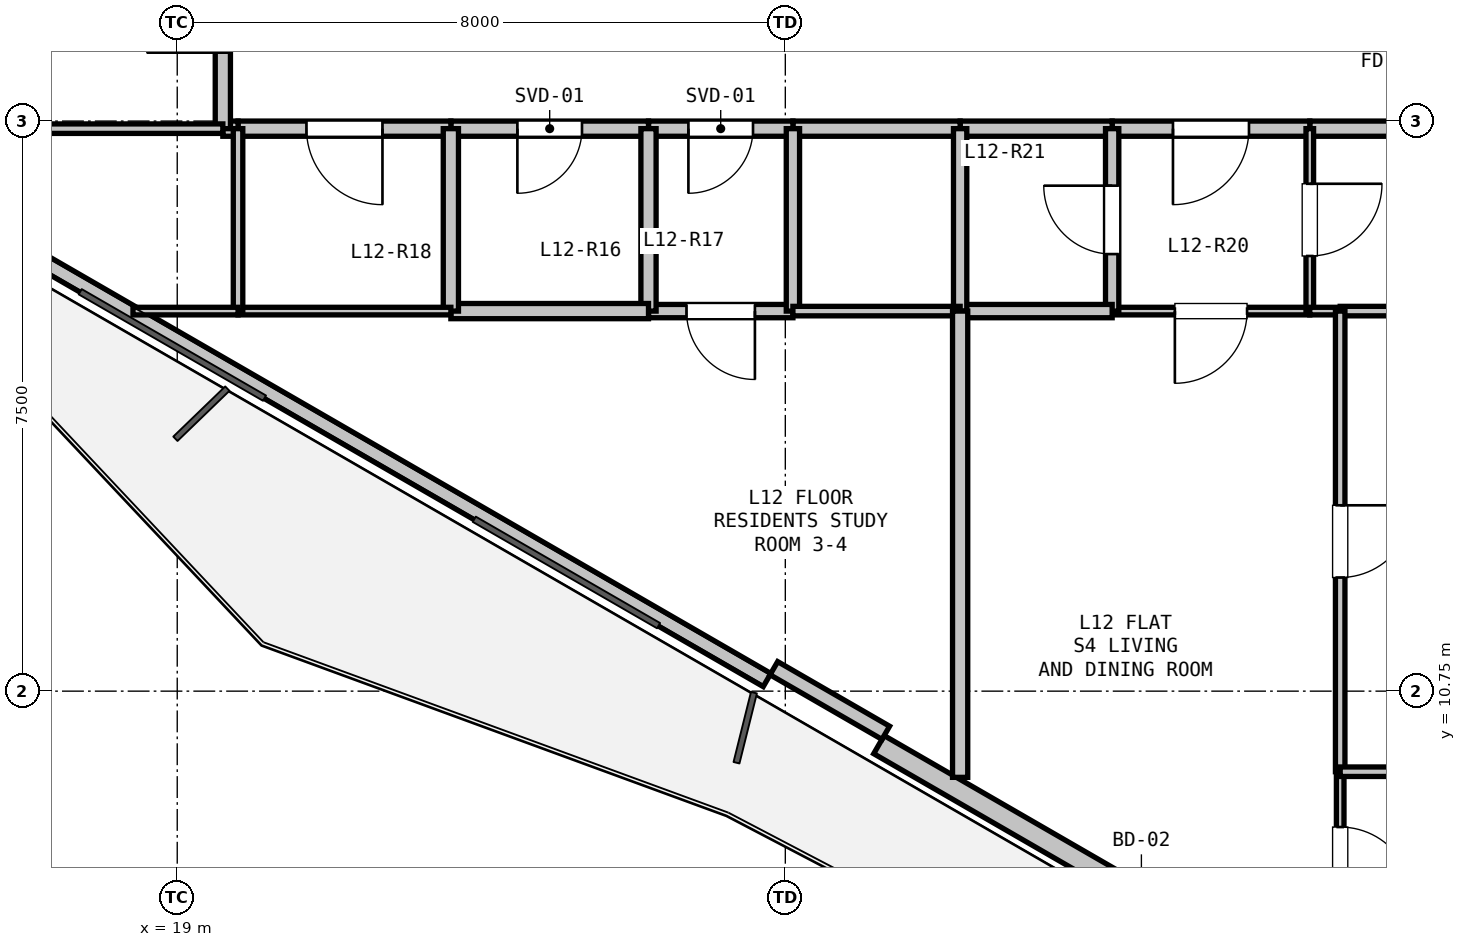
"""IFC4 building model, lengths in metres.
Left out: names, types, materials, properties, quantities, classifications, styles, units other than length and angle.
Written with IfcOpenShell. Run it as: python <this file> out.ifc"""

import sys

from ifc_helpers import new_model, si_unit, direction, frame, frame_2d, origin, place, context, subcontext, project, spatial, rectangle, extrude, element, fill, save


model = new_model("IFC4")
c1 = context("Model", 3, precision=1e-05, world=origin(), true_north=direction((0.0, 1.0)))
c2 = subcontext(c1, "Body", "Model", "MODEL_VIEW")
j1 = project(units=[si_unit("LENGTHUNIT", "METRE"), si_unit("PLANEANGLEUNIT", "RADIAN")], contexts=[c1])
p1 = place(None, origin())
s1 = spatial("IfcSite", under=j1, at=p1, CompositionType="ELEMENT")
p2 = place(p1, origin())
s2 = spatial("IfcBuilding", under=s1, at=p2, CompositionType="ELEMENT")
p3 = place(p2, frame((0.0, 0.0, 45.6)))
s3 = spatial("IfcBuildingStorey", under=s2, at=p3, CompositionType="ELEMENT", Elevation=45.6)
p4 = place(p3, frame((39.207, 3.71, 0.0), z_axis=(0.0, 0.0, 1.0), x_axis=(-0.86603192154, 0.499988710747, 0.0)))
e1 = element("IfcWall", 1, at=p4, inside=s3, PredefinedType="SOLIDWALL", context=c2, shape_type="SweptSolid", body=[
    extrude(rectangle(XDim=12.673, YDim=0.275, at=frame_2d((6.336, 0.0))), origin(), (0.0, 0.0, 1.0), 2.66),
])
p5 = place(p4, frame((8.136, 0.0, 0.0)))
e2 = element("IfcOpeningElement", 2, at=p5, cuts=e1, PredefinedType="OPENING", context=c2, shape_type="SweptSolid", body=[
    extrude(rectangle(XDim=1.1, YDim=2.1, at=frame_2d((0.55, 1.05))), frame((0.0, 0.147, 0.0), z_axis=(0.0, -1.0, 0.0), x_axis=(1.0, 0.0, 0.0)), (0.0, 0.0, 1.0), 0.295),
])
p6 = place(p4, frame((2.518, 0.0, 0.9)))
e3 = element("IfcOpeningElement", 3, at=p6, cuts=e1, PredefinedType="OPENING", context=c2, shape_type="SweptSolid", body=[
    extrude(rectangle(XDim=1.2, YDim=1.4, at=frame_2d((0.6, 0.7))), frame((0.0, 0.147, 0.0), z_axis=(0.0, -1.0, 0.0), x_axis=(1.0, 0.0, 0.0)), (0.0, 0.0, 1.0), 0.295),
])
p7 = place(p3, frame((26.76, 10.896, 0.0), z_axis=(0.0, 0.0, 1.0), x_axis=(-0.866027351828, 0.499996625875, 0.0)))
e4 = element("IfcWall", 4, at=p7, inside=s3, PredefinedType="PARAPET", context=c2, shape_type="SweptSolid", body=[
    extrude(rectangle(XDim=11.973, YDim=0.2, at=frame_2d((5.987, 0.0))), origin(), (0.0, 0.0, 1.0), 0.2),
])
p8 = place(p3, frame((28.322, 10.202, 0.0), z_axis=(0.0, 0.0, 1.0), x_axis=(-0.86605165483, 0.499954529098, 0.0)))
e5 = element("IfcWall", 5, at=p8, inside=s3, PredefinedType="PARAPET", context=c2, shape_type="SweptSolid", body=[
    extrude(rectangle(XDim=1.7, YDim=0.2, at=frame_2d((0.85, 0.0))), origin(), (0.0, 0.0, 1.0), 2.66),
])
p9 = place(p3, frame((35.8, 18.15, 0.0), z_axis=(0.0, 0.0, 1.0), x_axis=(-1.0, 0.0, 0.0)))
e6 = element("IfcWall", 6, at=p9, inside=s3, PredefinedType="PARTITIONING", context=c2, shape_type="SweptSolid", body=[
    extrude(rectangle(XDim=1.9, YDim=0.2, at=frame_2d((0.95, 0.0))), origin(), (0.0, 0.0, 1.0), 3.04),
])
p10 = place(p3, frame((33.9, 18.15, 0.0), z_axis=(0.0, 0.0, 1.0), x_axis=(-1.0, 0.0, 0.0)))
e7 = element("IfcWall", 7, at=p10, inside=s3, PredefinedType="PARTITIONING", context=c2, shape_type="SweptSolid", body=[
    extrude(rectangle(XDim=2.6, YDim=0.2, at=frame_2d((1.3, 0.0))), origin(), (0.0, 0.0, 1.0), 3.04),
])
p11 = place(p10, frame((0.8, 0.0, 0.0)))
e8 = element("IfcOpeningElement", 8, at=p11, cuts=e7, PredefinedType="OPENING", context=c2, shape_type="SweptSolid", body=[
    extrude(rectangle(XDim=1.0, YDim=2.15, at=frame_2d((0.5, 1.075))), frame((0.0, 0.11, 0.0), z_axis=(0.0, -1.0, 0.0), x_axis=(1.0, 0.0, 0.0)), (0.0, 0.0, 1.0), 0.22),
])
p12 = place(p3, frame((31.3, 18.15, 0.0), z_axis=(0.0, 0.0, 1.0), x_axis=(-1.0, 0.0, 0.0)))
e9 = element("IfcWall", 9, at=p12, inside=s3, PredefinedType="PARTITIONING", context=c2, shape_type="SweptSolid", body=[
    extrude(rectangle(XDim=2.0, YDim=0.2, at=frame_2d((1.0, 0.0))), origin(), (0.0, 0.0, 1.0), 3.04),
])
p13 = place(p3, frame((29.3, 18.15, 0.0), z_axis=(0.0, 0.0, 1.0), x_axis=(-1.0, 0.0, 0.0)))
e10 = element("IfcWall", 10, at=p13, inside=s3, PredefinedType="PARTITIONING", context=c2, shape_type="SweptSolid", body=[
    extrude(rectangle(XDim=2.2, YDim=0.2, at=frame_2d((1.1, 0.0))), origin(), (0.0, 0.0, 1.0), 3.04),
])
p14 = place(p3, frame((27.1, 18.15, 0.0), z_axis=(0.0, 0.0, 1.0), x_axis=(-1.0, 0.0, 0.0)))
e11 = element("IfcWall", 11, at=p14, inside=s3, PredefinedType="PARTITIONING", context=c2, shape_type="SweptSolid", body=[
    extrude(rectangle(XDim=1.9, YDim=0.2, at=frame_2d((0.95, 0.0))), origin(), (0.0, 0.0, 1.0), 3.04),
])
p15 = place(p14, frame((0.525, 0.0, 0.0)))
e12 = element("IfcOpeningElement", 12, at=p15, cuts=e11, PredefinedType="OPENING", context=c2, shape_type="SweptSolid", body=[
    extrude(rectangle(XDim=0.85, YDim=2.1, at=frame_2d((0.425, 1.05))), frame((0.0, 0.11, 0.0), z_axis=(0.0, -1.0, 0.0), x_axis=(1.0, 0.0, 0.0)), (0.0, 0.0, 1.0), 0.22),
])
p16 = place(p3, frame((25.2, 18.15, 0.0), z_axis=(0.0, 0.0, 1.0), x_axis=(-1.0, 0.0, 0.0)))
e13 = element("IfcWall", 13, at=p16, inside=s3, PredefinedType="PARTITIONING", context=c2, shape_type="SweptSolid", body=[
    extrude(rectangle(XDim=2.6, YDim=0.2, at=frame_2d((1.3, 0.0))), origin(), (0.0, 0.0, 1.0), 2.337),
])
p17 = place(p16, frame((0.875, 0.0, 0.0)))
e14 = element("IfcOpeningElement", 14, at=p17, cuts=e13, PredefinedType="OPENING", context=c2, shape_type="SweptSolid", body=[
    extrude(rectangle(XDim=0.85, YDim=2.1, at=frame_2d((0.425, 1.05))), frame((0.0, 0.11, 0.0), z_axis=(0.0, -1.0, 0.0), x_axis=(1.0, 0.0, 0.0)), (0.0, 0.0, 1.0), 0.22),
])
p18 = place(p3, frame((22.6, 18.15, 0.0), z_axis=(0.0, 0.0, 1.0), x_axis=(-1.0, 0.0, 0.0)))
e15 = element("IfcWall", 15, at=p18, inside=s3, PredefinedType="PARTITIONING", context=c2, shape_type="SweptSolid", body=[
    extrude(rectangle(XDim=2.8, YDim=0.2, at=frame_2d((1.4, 0.0))), origin(), (0.0, 0.0, 1.0), 3.04),
])
p19 = place(p18, frame((0.9, 0.0, 0.0)))
e16 = element("IfcOpeningElement", 16, at=p19, cuts=e15, PredefinedType="OPENING", context=c2, shape_type="SweptSolid", body=[
    extrude(rectangle(XDim=1.0, YDim=2.15, at=frame_2d((0.5, 1.075))), frame((0.0, 0.11, 0.0), z_axis=(0.0, -1.0, 0.0), x_axis=(1.0, 0.0, 0.0)), (0.0, 0.0, 1.0), 0.22),
])
p20 = place(p3, frame((19.8, 18.15, 0.0), z_axis=(0.0, 0.0, 1.0), x_axis=(-1.0, 0.0, 0.0)))
e17 = element("IfcWall", 17, at=p20, inside=s3, PredefinedType="PARTITIONING", context=c2, shape_type="SweptSolid", body=[
    extrude(rectangle(XDim=0.2, YDim=0.2, at=frame_2d((0.1, 0.0))), origin(), (0.0, 0.0, 1.0), 3.04),
])
p21 = place(p3, frame((19.6, 18.15, 0.0), z_axis=(0.0, 0.0, 1.0), x_axis=(0.0, 1.0, 0.0)))
e18 = element("IfcWall", 18, at=p21, inside=s3, PredefinedType="PARTITIONING", context=c2, shape_type="SweptSolid", body=[
    extrude(rectangle(XDim=3.0, YDim=0.2, at=frame_2d((1.5, 0.0))), origin(), (0.0, 0.0, 1.0), 2.337),
])
p22 = place(p21, frame((1.0, 0.0, 0.0)))
e19 = element("IfcOpeningElement", 19, at=p22, cuts=e18, PredefinedType="OPENING", context=c2, shape_type="SweptSolid", body=[
    extrude(rectangle(XDim=1.0, YDim=2.15, at=frame_2d((0.5, 1.075))), frame((0.0, 0.11, 0.0), z_axis=(0.0, -1.0, 0.0), x_axis=(1.0, 0.0, 0.0)), (0.0, 0.0, 1.0), 0.22),
])
p23 = place(p3, frame((33.9, 15.75, 0.0), z_axis=(0.0, 0.0, 1.0), x_axis=(-1.0, 0.0, 0.0)))
e20 = element("IfcWall", 20, at=p23, inside=s3, PredefinedType="PARTITIONING", context=c2, shape_type="SweptSolid", body=[
    extrude(rectangle(XDim=2.6, YDim=0.1, at=frame_2d((1.3, 0.0))), origin(), (0.0, 0.0, 1.0), 3.04),
])
p24 = place(p23, frame((0.825, 0.0, 0.0)))
e21 = element("IfcOpeningElement", 21, at=p24, cuts=e20, PredefinedType="OPENING", context=c2, shape_type="SweptSolid", body=[
    extrude(rectangle(XDim=0.95, YDim=2.1, at=frame_2d((0.475, 1.05))), frame((0.0, 0.06, 0.0), z_axis=(0.0, -1.0, 0.0), x_axis=(1.0, 0.0, 0.0)), (0.0, 0.0, 1.0), 0.12),
])
p25 = place(p3, frame((31.3, 15.75, 0.0), z_axis=(0.0, 0.0, 1.0), x_axis=(0.0, 1.0, 0.0)))
e22 = element("IfcWall", 22, at=p25, inside=s3, PredefinedType="PLUMBINGWALL", context=c2, shape_type="SweptSolid", body=[
    extrude(rectangle(XDim=2.4, YDim=0.175, at=frame_2d((1.2, 0.0))), origin(), (0.0, 0.0, 1.0), 3.04),
])
p26 = place(p25, frame((0.75, 0.0, 0.0)))
e23 = element("IfcOpeningElement", 23, at=p26, cuts=e22, PredefinedType="OPENING", context=c2, shape_type="SweptSolid", body=[
    extrude(rectangle(XDim=0.9, YDim=2.1, at=frame_2d((0.45, 1.05))), frame((0.0, 0.097, 0.0), z_axis=(0.0, -1.0, 0.0), x_axis=(1.0, 0.0, 0.0)), (0.0, 0.0, 1.0), 0.195),
])
p27 = place(p3, frame((33.9, 18.15, 0.0), z_axis=(0.0, 0.0, 1.0), x_axis=(0.0, -1.0, 0.0)))
e24 = element("IfcWall", 24, at=p27, inside=s3, PredefinedType="PARTITIONING", context=c2, shape_type="SweptSolid", body=[
    extrude(rectangle(XDim=2.4, YDim=0.1, at=frame_2d((1.2, 0.0))), origin(), (0.0, 0.0, 1.0), 3.04),
])
p28 = place(p27, frame((0.725, 0.0, 0.0)))
e25 = element("IfcOpeningElement", 25, at=p28, cuts=e24, PredefinedType="OPENING", context=c2, shape_type="SweptSolid", body=[
    extrude(rectangle(XDim=0.95, YDim=2.1, at=frame_2d((0.475, 1.05))), frame((0.0, 0.06, 0.0), z_axis=(0.0, -1.0, 0.0), x_axis=(1.0, 0.0, 0.0)), (0.0, 0.0, 1.0), 0.12),
])
p29 = place(p3, frame((27.1, 15.75, 0.0), z_axis=(0.0, 0.0, 1.0), x_axis=(-1.0, 0.0, 0.0)))
e26 = element("IfcWall", 26, at=p29, inside=s3, PredefinedType="PLUMBINGWALL", context=c2, shape_type="SweptSolid", body=[
    extrude(rectangle(XDim=1.9, YDim=0.175, at=frame_2d((0.95, 0.0))), origin(), (0.0, 0.0, 1.0), 2.337),
])
p30 = place(p29, frame((0.5, 0.0, 0.0)))
e27 = element("IfcOpeningElement", 27, at=p30, cuts=e26, PredefinedType="OPENING", context=c2, shape_type="SweptSolid", body=[
    extrude(rectangle(XDim=0.9, YDim=2.1, at=frame_2d((0.45, 1.05))), frame((0.0, 0.097, 0.0), z_axis=(0.0, -1.0, 0.0), x_axis=(1.0, 0.0, 0.0)), (0.0, 0.0, 1.0), 0.195),
])
p31 = place(p3, frame((25.2, 15.75, 0.0), z_axis=(0.0, 0.0, 1.0), x_axis=(0.0, 1.0, 0.0)))
e28 = element("IfcWall", 28, at=p31, inside=s3, PredefinedType="PARTITIONING", context=c2, shape_type="SweptSolid", body=[
    extrude(rectangle(XDim=2.4, YDim=0.2, at=frame_2d((1.2, 0.0))), origin(), (0.0, 0.0, 1.0), 2.337),
])
p32 = place(p3, frame((27.1, 18.15, 0.0), z_axis=(0.0, 0.0, 1.0), x_axis=(0.0, -1.0, 0.0)))
e29 = element("IfcWall", 29, at=p32, inside=s3, PredefinedType="PLUMBINGWALL", context=c2, shape_type="SweptSolid", body=[
    extrude(rectangle(XDim=2.4, YDim=0.175, at=frame_2d((1.2, 0.0))), origin(), (0.0, 0.0, 1.0), 3.04),
])
p33 = place(p3, frame((31.3, 15.75, 0.0), z_axis=(0.0, 0.0, 1.0), x_axis=(-1.0, 0.0, 0.0)))
e30 = element("IfcWall", 30, at=p33, inside=s3, PredefinedType="PLUMBINGWALL", context=c2, shape_type="SweptSolid", body=[
    extrude(rectangle(XDim=2.0, YDim=0.175, at=frame_2d((1.0, 0.0))), origin(), (0.0, 0.0, 1.0), 3.04),
])
p34 = place(p3, frame((29.3, 15.75, 0.0), z_axis=(0.0, 0.0, 1.0), x_axis=(0.0, 1.0, 0.0)))
e31 = element("IfcWall", 31, at=p34, inside=s3, PredefinedType="PLUMBINGWALL", context=c2, shape_type="SweptSolid", body=[
    extrude(rectangle(XDim=2.4, YDim=0.175, at=frame_2d((1.2, 0.0))), origin(), (0.0, 0.0, 1.0), 3.04),
])
p35 = place(p3, frame((43.688, 15.75, 0.0), z_axis=(0.0, 0.0, 1.0), x_axis=(-1.0, 0.0, 0.0)))
e32 = element("IfcWall", 32, at=p35, inside=s3, PredefinedType="PARTITIONING", context=c2, shape_type="SweptSolid", body=[
    extrude(rectangle(XDim=9.388, YDim=0.125, at=frame_2d((4.694, 0.0))), origin(), (0.0, 0.0, 1.0), 2.337),
])
p36 = place(p35, frame((4.219, 0.0, 0.0)))
e33 = element("IfcOpeningElement", 33, at=p36, cuts=e32, PredefinedType="OPENING", context=c2, shape_type="SweptSolid", body=[
    extrude(rectangle(XDim=0.95, YDim=2.1, at=frame_2d((0.475, 1.05))), frame((0.0, 0.073, 0.0), z_axis=(0.0, -1.0, 0.0), x_axis=(1.0, 0.0, 0.0)), (0.0, 0.0, 1.0), 0.145),
])
p37 = place(p3, frame((34.3, 15.75, 0.0), z_axis=(0.0, 0.0, 1.0), x_axis=(-1.0, 0.0, 0.0)))
e34 = element("IfcWall", 34, at=p37, inside=s3, PredefinedType="PARTITIONING", context=c2, shape_type="SweptSolid", body=[
    extrude(rectangle(XDim=0.4, YDim=0.1, at=frame_2d((0.2, 0.0))), origin(), (0.0, 0.0, 1.0), 3.04),
])
p38 = place(p3, frame((19.6, 18.15, 0.0), z_axis=(0.0, 0.0, 1.0), x_axis=(-1.0, 0.0, 0.0)))
e35 = element("IfcWall", 35, at=p38, inside=s3, PredefinedType="PARTITIONING", context=c2, shape_type="SweptSolid", body=[
    extrude(rectangle(XDim=2.45, YDim=0.125, at=frame_2d((1.225, 0.0))), origin(), (0.0, 0.0, 1.0), 3.04),
])
p39 = place(p3, frame((25.2, 15.75, 0.0), z_axis=(0.0, 0.0, 1.0), x_axis=(-1.0, 0.0, 0.0)))
e36 = element("IfcWall", 36, at=p39, inside=s3, PredefinedType="PARTITIONING", context=c2, shape_type="SweptSolid", body=[
    extrude(rectangle(XDim=2.6, YDim=0.2, at=frame_2d((1.3, 0.0))), origin(), (0.0, 0.0, 1.0), 3.04),
])
p40 = place(p3, frame((22.6, 15.75, 0.0), z_axis=(0.0, 0.0, 1.0), x_axis=(0.0, 1.0, 0.0)))
e37 = element("IfcWall", 37, at=p40, inside=s3, PredefinedType="PARTITIONING", context=c2, shape_type="SweptSolid", body=[
    extrude(rectangle(XDim=2.4, YDim=0.2, at=frame_2d((1.2, 0.0))), origin(), (0.0, 0.0, 1.0), 3.04),
])
p41 = place(p3, frame((22.6, 15.75, 0.0), z_axis=(0.0, 0.0, 1.0), x_axis=(-1.0, 0.0, 0.0)))
e38 = element("IfcWall", 38, at=p41, inside=s3, PredefinedType="PARTITIONING", context=c2, shape_type="SweptSolid", body=[
    extrude(rectangle(XDim=2.8, YDim=0.1, at=frame_2d((1.4, 0.0))), origin(), (0.0, 0.0, 1.0), 2.65),
])
p42 = place(p3, frame((19.8, 15.75, 0.0), z_axis=(0.0, 0.0, 1.0), x_axis=(0.0, 1.0, 0.0)))
e39 = element("IfcWall", 39, at=p42, inside=s3, PredefinedType="PARTITIONING", context=c2, shape_type="SweptSolid", body=[
    extrude(rectangle(XDim=2.4, YDim=0.125, at=frame_2d((1.2, 0.0))), origin(), (0.0, 0.0, 1.0), 2.65),
])
p43 = place(p3, frame((18.418, 15.75, 0.0), z_axis=(0.0, 0.0, 1.0), x_axis=(1.0, 0.0, 0.0)))
e40 = element("IfcWall", 40, at=p43, inside=s3, PredefinedType="PARTITIONING", context=c2, shape_type="SweptSolid", body=[
    extrude(rectangle(XDim=1.382, YDim=0.1, at=frame_2d((0.691, 0.0))), origin(), (0.0, 0.0, 1.0), 2.365),
])
p44 = place(p3, frame((27.1, 15.75, 0.0), z_axis=(0.0, 0.0, 1.0), x_axis=(1.0, 0.0, 0.0)))
e41 = element("IfcWall", 41, at=p44, inside=s3, PredefinedType="PARTITIONING", context=c2, shape_type="SweptSolid", body=[
    extrude(rectangle(XDim=2.2, YDim=0.125, at=frame_2d((1.1, 0.0))), origin(), (0.0, 0.0, 1.0), 3.04),
])
p45 = place(p3, frame((29.3, 15.75, 0.0), z_axis=(0.0, 0.0, 1.0), x_axis=(0.0, -1.0, 0.0)))
e42 = element("IfcWall", 42, at=p45, inside=s3, PredefinedType="PARTITIONING", context=c2, shape_type="SweptSolid", body=[
    extrude(rectangle(XDim=6.134, YDim=0.2, at=frame_2d((3.067, 0.0))), origin(), (0.0, 0.0, 1.0), 2.337),
])
p46 = place(p3, frame((34.3, 15.75, 0.0), z_axis=(0.0, 0.0, 1.0), x_axis=(0.0, -1.0, 0.0)))
e43 = element("IfcWall", 43, at=p46, inside=s3, PredefinedType="PARTITIONING", context=c2, shape_type="SweptSolid", body=[
    extrude(rectangle(XDim=6.06, YDim=0.125, at=frame_2d((3.03, 0.0))), origin(), (0.0, 0.0, 1.0), 3.04),
])
p47 = place(p46, frame((2.555, 0.0, 0.0)))
e44 = element("IfcOpeningElement", 44, at=p47, cuts=e43, PredefinedType="OPENING", context=c2, shape_type="SweptSolid", body=[
    extrude(rectangle(XDim=0.95, YDim=2.1, at=frame_2d((0.475, 1.05))), frame((0.0, 0.073, 0.0), z_axis=(0.0, -1.0, 0.0), x_axis=(1.0, 0.0, 0.0)), (0.0, 0.0, 1.0), 0.145),
])
p48 = place(p3, frame((34.3, 9.69, 0.0), z_axis=(0.0, 0.0, 1.0), x_axis=(0.0, -1.0, 0.0)))
e45 = element("IfcWall", 45, at=p48, inside=s3, PredefinedType="PARTITIONING", context=c2, shape_type="SweptSolid", body=[
    extrude(rectangle(XDim=2.961, YDim=0.1, at=frame_2d((1.48, 0.0))), origin(), (0.0, 0.0, 1.0), 3.04),
])
p49 = place(p48, frame((0.728, 0.0, 0.0)))
e46 = element("IfcOpeningElement", 46, at=p49, cuts=e45, PredefinedType="OPENING", context=c2, shape_type="SweptSolid", body=[
    extrude(rectangle(XDim=0.95, YDim=2.1, at=frame_2d((0.475, 1.05))), frame((0.0, 0.06, 0.0), z_axis=(0.0, -1.0, 0.0), x_axis=(1.0, 0.0, 0.0)), (0.0, 0.0, 1.0), 0.12),
])
p50 = place(p3, frame((34.3, 9.69, 0.0), z_axis=(0.0, 0.0, 1.0), x_axis=(1.0, 0.0, 0.0)))
e47 = element("IfcWall", 47, at=p50, inside=s3, PredefinedType="PARTITIONING", context=c2, shape_type="SweptSolid", body=[
    extrude(rectangle(XDim=4.78, YDim=0.125, at=frame_2d((2.39, 0.0))), origin(), (0.0, 0.0, 1.0), 3.04),
])
p51 = place(p50, frame((1.915, 0.0, 0.0)))
e48 = element("IfcOpeningElement", 48, at=p51, cuts=e47, PredefinedType="OPENING", context=c2, shape_type="SweptSolid", body=[
    extrude(rectangle(XDim=0.95, YDim=2.1, at=frame_2d((0.475, 1.05))), frame((0.0, 0.073, 0.0), z_axis=(0.0, -1.0, 0.0), x_axis=(1.0, 0.0, 0.0)), (0.0, 0.0, 1.0), 0.145),
])
p52 = place(p11, origin())
e49 = element("IfcDoor", 49, at=p52, inside=s3, OperationType="SINGLE_SWING_RIGHT", PredefinedType="DOOR", context=c2, shape_type="SweptSolid", body=[
    extrude(rectangle(XDim=1.0, YDim=2.15, at=frame_2d((0.5, 1.075))), frame((0.0, 0.025, 0.0), z_axis=(0.0, -1.0, 0.0), x_axis=(1.0, 0.0, 0.0)), (0.0, 0.0, 1.0), 0.05),
])
fill(e8, e49)
p53 = place(p15, origin())
e50 = element("IfcDoor", 50, at=p53, inside=s3, OperationType="SINGLE_SWING_RIGHT", PredefinedType="DOOR", context=c2, shape_type="SweptSolid", body=[
    extrude(rectangle(XDim=0.85, YDim=2.1, at=frame_2d((0.425, 1.05))), frame((0.0, 0.025, 0.0), z_axis=(0.0, -1.0, 0.0), x_axis=(1.0, 0.0, 0.0)), (0.0, 0.0, 1.0), 0.05),
])
fill(e12, e50)
p54 = place(p17, origin())
e51 = element("IfcDoor", 51, at=p54, inside=s3, OperationType="SINGLE_SWING_RIGHT", PredefinedType="DOOR", context=c2, shape_type="SweptSolid", body=[
    extrude(rectangle(XDim=0.85, YDim=2.1, at=frame_2d((0.425, 1.05))), frame((0.0, 0.025, 0.0), z_axis=(0.0, -1.0, 0.0), x_axis=(1.0, 0.0, 0.0)), (0.0, 0.0, 1.0), 0.05),
])
fill(e14, e51)
p55 = place(p19, origin())
e52 = element("IfcDoor", 52, at=p55, inside=s3, OperationType="SINGLE_SWING_LEFT", PredefinedType="DOOR", context=c2, shape_type="SweptSolid", body=[
    extrude(rectangle(XDim=1.0, YDim=2.15, at=frame_2d((0.5, 1.075))), frame((0.0, 0.025, 0.0), z_axis=(0.0, -1.0, 0.0), x_axis=(1.0, 0.0, 0.0)), (0.0, 0.0, 1.0), 0.05),
])
fill(e16, e52)
p56 = place(p26, origin())
e53 = element("IfcDoor", 53, at=p56, inside=s3, OperationType="SINGLE_SWING_RIGHT", PredefinedType="DOOR", context=c2, shape_type="SweptSolid", body=[
    extrude(rectangle(XDim=0.9, YDim=2.1, at=frame_2d((0.45, 1.05))), frame((0.0, 0.025, 0.0), z_axis=(0.0, -1.0, 0.0), x_axis=(1.0, 0.0, 0.0)), (0.0, 0.0, 1.0), 0.05),
])
fill(e23, e53)
p57 = place(p28, origin())
e54 = element("IfcDoor", 54, at=p57, inside=s3, OperationType="SINGLE_SWING_LEFT", PredefinedType="DOOR", context=c2, shape_type="SweptSolid", body=[
    extrude(rectangle(XDim=0.95, YDim=2.1, at=frame_2d((0.475, 1.05))), frame((0.0, 0.025, 0.0), z_axis=(0.0, -1.0, 0.0), x_axis=(1.0, 0.0, 0.0)), (0.0, 0.0, 1.0), 0.05),
])
fill(e25, e54)
p58 = place(p24, origin())
e55 = element("IfcDoor", 55, at=p58, inside=s3, OperationType="SINGLE_SWING_RIGHT", PredefinedType="DOOR", context=c2, shape_type="SweptSolid", body=[
    extrude(rectangle(XDim=0.95, YDim=2.1, at=frame_2d((0.475, 1.05))), frame((0.0, 0.025, 0.0), z_axis=(0.0, -1.0, 0.0), x_axis=(1.0, 0.0, 0.0)), (0.0, 0.0, 1.0), 0.05),
])
fill(e21, e55)
p59 = place(p49, origin())
e56 = element("IfcDoor", 56, at=p59, inside=s3, OperationType="SINGLE_SWING_RIGHT", PredefinedType="DOOR", context=c2, shape_type="SweptSolid", body=[
    extrude(rectangle(XDim=0.95, YDim=2.1, at=frame_2d((0.475, 1.05))), frame((0.0, 0.025, 0.0), z_axis=(0.0, -1.0, 0.0), x_axis=(1.0, 0.0, 0.0)), (0.0, 0.0, 1.0), 0.05),
])
fill(e46, e56)
p60 = place(p47, origin())
e57 = element("IfcDoor", 57, at=p60, inside=s3, OperationType="SINGLE_SWING_LEFT", PredefinedType="DOOR", context=c2, shape_type="SweptSolid", body=[
    extrude(rectangle(XDim=0.95, YDim=2.1, at=frame_2d((0.475, 1.05))), frame((0.0, 0.025, 0.0), z_axis=(0.0, -1.0, 0.0), x_axis=(1.0, 0.0, 0.0)), (0.0, 0.0, 1.0), 0.05),
])
fill(e44, e57)
p61 = place(p30, origin())
e58 = element("IfcDoor", 58, at=p61, inside=s3, OperationType="SINGLE_SWING_LEFT", PredefinedType="DOOR", context=c2, shape_type="SweptSolid", body=[
    extrude(rectangle(XDim=0.9, YDim=2.1, at=frame_2d((0.45, 1.05))), frame((0.0, 0.025, 0.0), z_axis=(0.0, -1.0, 0.0), x_axis=(1.0, 0.0, 0.0)), (0.0, 0.0, 1.0), 0.05),
])
fill(e27, e58)
save(model, sys.argv[1])
